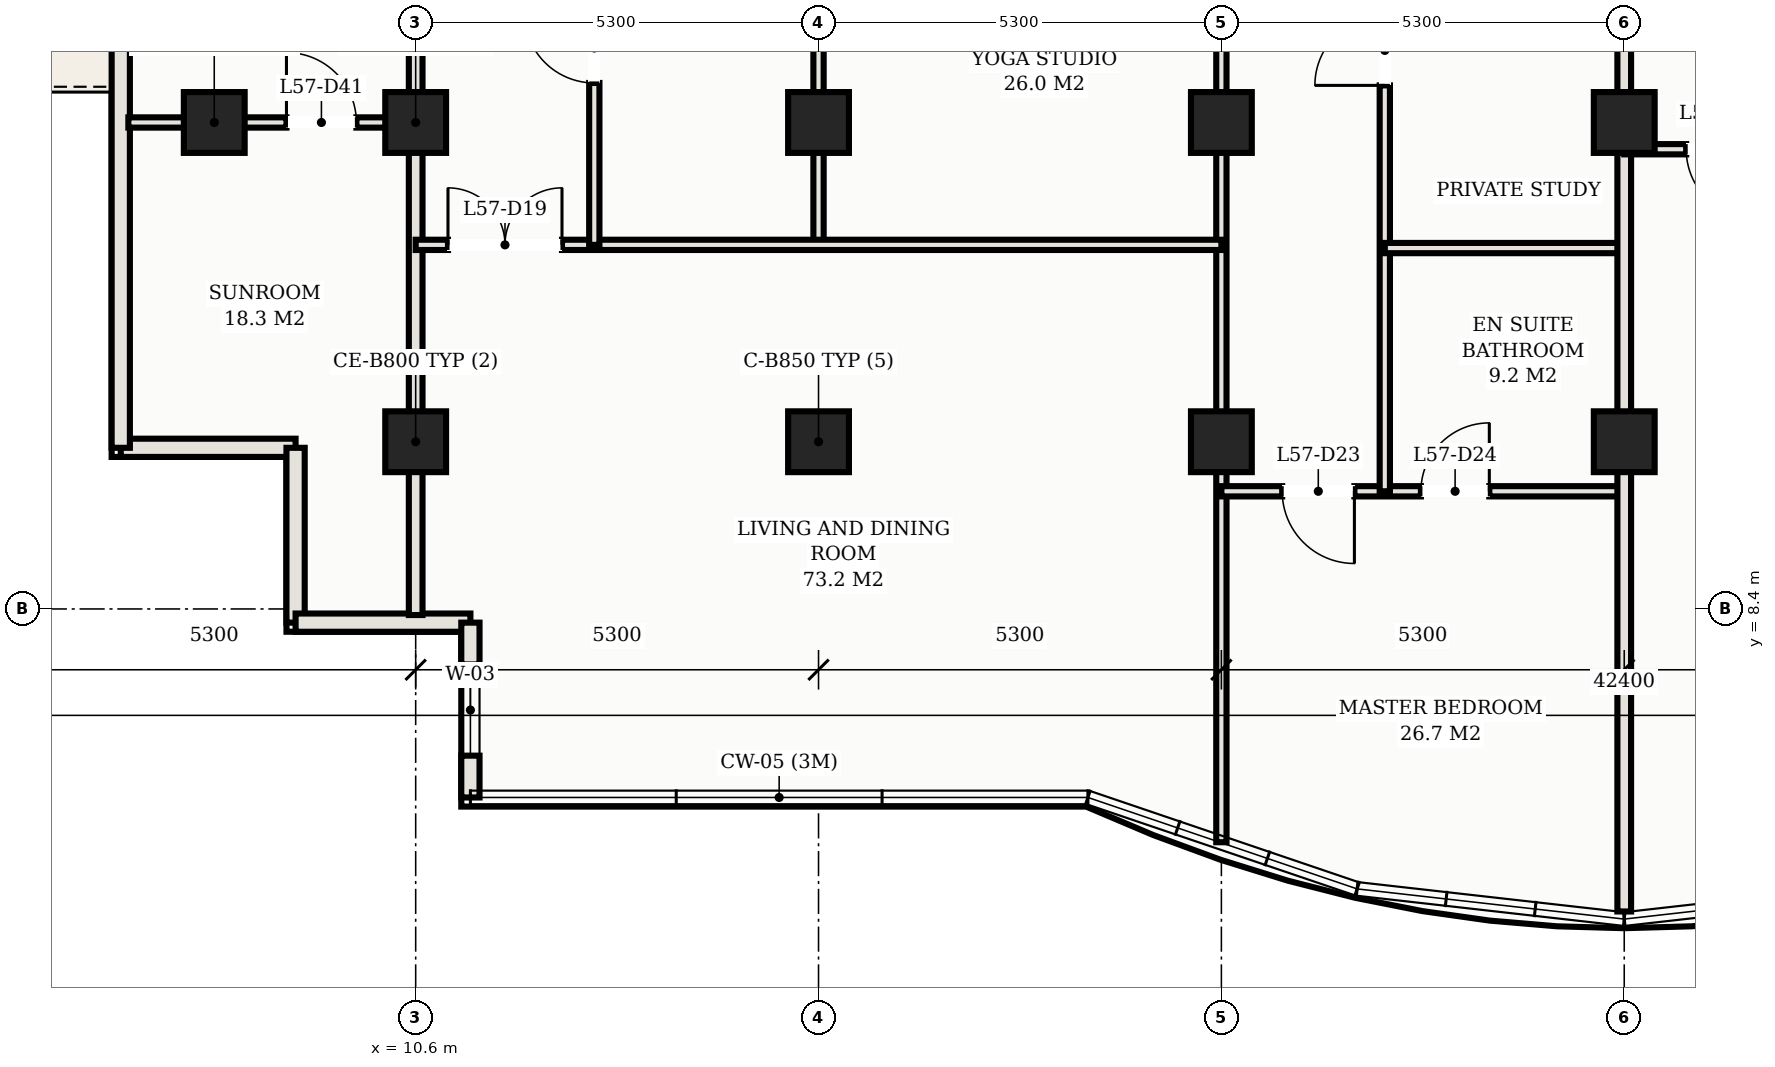
"""IFC4 building model, lengths in metres.
Left out: names, types, materials, properties, quantities, classifications, styles, units other than length and angle.
Written with IfcOpenShell. Run it as: python <this file> out.ifc"""

import sys

from ifc_helpers import new_model, si_unit, direction, frame, frame_2d, origin, origin_2d, place, context, subcontext, project, spatial, rectangle, hollow_rectangle, extrude, element, fill, save


model = new_model("IFC4")
c1 = context("Model", 3, precision=1e-05, world=origin(), true_north=direction((0.0, 1.0)))
c2 = subcontext(c1, "Body", "Model", "MODEL_VIEW")
j1 = project(units=[si_unit("LENGTHUNIT", "METRE"), si_unit("PLANEANGLEUNIT", "RADIAN")], contexts=[c1])
p1 = place(None, origin())
s1 = spatial("IfcSite", under=j1, at=p1, CompositionType="ELEMENT")
p2 = place(p1, origin())
s2 = spatial("IfcBuilding", under=s1, at=p2, CompositionType="ELEMENT")
p3 = place(p2, frame((0.0, 0.0, 209.9)))
s3 = spatial("IfcBuildingStorey", under=s2, at=p3, CompositionType="ELEMENT", Elevation=209.9)
for number, where, z_axis, x_axis in (
    (1, (10.6, 14.8, 0.0), (0.0, 0.0, 1.0), (1.0, 0.0, 0.0)),
    (2, (10.6, 10.6, 0.0), (0.0, 0.0, 1.0), (1.0, 0.0, 0.0)),
    (3, (15.9, 14.8, 0.0), (0.0, 0.0, 1.0), (1.0, 0.0, 0.0)),
    (4, (15.9, 10.6, 0.0), (0.0, 0.0, 1.0), (1.0, 0.0, 0.0)),
    (5, (21.2, 14.8, 0.0), (0.0, 0.0, 1.0), (1.0, 0.0, 0.0)),
    (6, (21.2, 10.6, 0.0), (0.0, 0.0, 1.0), (1.0, 0.0, 0.0)),
    (7, (26.5, 14.8, 0.0), (0.0, 0.0, 1.0), (1.0, 0.0, 0.0)),
    (8, (26.5, 10.6, 0.0), (0.0, 0.0, 1.0), (1.0, 0.0, 0.0)),
    (9, (7.95, 14.8, 0.0), (0.0, 0.0, 1.0), (1.0, 0.0, 0.0)),
):
    element("IfcColumn", number, at=place(p3, frame(where, z_axis=z_axis, x_axis=x_axis)), inside=s3, PredefinedType="COLUMN", context=c2, shape_type="SweptSolid", body=[
        extrude(hollow_rectangle(XDim=0.8, YDim=0.8, WallThickness=0.028, at=origin_2d()), origin(), (0.0, 0.0, 1.0), 3.3),
    ])
for number, where, z_axis, x_axis in (
    (10, (6.72, 10.52, 0.0), (0.0, 0.0, 1.0), (1.0, 0.0, 0.0)),
    (11, (9.02, 10.52, 0.0), (0.0, 0.0, 1.0), (0.0, -1.0, 0.0)),
    (12, (9.02, 8.22, 0.0), (0.0, 0.0, 1.0), (1.0, 0.0, 0.0)),
):
    element("IfcWall", number, at=place(p3, frame(where, z_axis=z_axis, x_axis=x_axis)), inside=s3, PredefinedType="SOLIDWALL", context=c2, shape_type="SweptSolid", body=[
        extrude(rectangle(XDim=2.3, YDim=0.24, at=frame_2d((1.15, 0.0))), origin(), (0.0, 0.0, 1.0), 3.11),
    ])
p4 = place(p3, frame((11.32, 8.22, 0.0), z_axis=(0.0, 0.0, 1.0), x_axis=(0.0, -1.0, 0.0)))
e13 = element("IfcWall", 13, at=p4, inside=s3, PredefinedType="SOLIDWALL", context=c2, shape_type="SweptSolid", body=[
    extrude(rectangle(XDim=2.3, YDim=0.24, at=frame_2d((1.15, 0.0))), origin(), (0.0, 0.0, 1.0), 3.11),
])
p5 = place(p4, frame((0.55, 0.0, 0.75)))
e14 = element("IfcOpeningElement", 14, at=p5, cuts=e13, PredefinedType="OPENING", context=c2, shape_type="SweptSolid", body=[
    extrude(rectangle(XDim=1.2, YDim=1.5, at=frame_2d((0.6, 0.75))), frame((0.0, 0.13, 0.0), z_axis=(0.0, -1.0, 0.0), x_axis=(1.0, 0.0, 0.0)), (0.0, 0.0, 1.0), 0.26),
])
p6 = place(p3, frame((6.72, 36.93, 0.0), z_axis=(0.0, 0.0, 1.0), x_axis=(0.0, -1.0, 0.0)))
e15 = element("IfcWall", 15, at=p6, inside=s3, PredefinedType="SOLIDWALL", context=c2, shape_type="SweptSolid", body=[
    extrude(rectangle(XDim=26.41, YDim=0.24, at=frame_2d((13.205, 0.0))), origin(), (0.0, 0.0, 1.0), 3.11),
])
p7 = place(p6, frame((18.13, 0.0, 0.0)))
e16 = element("IfcOpeningElement", 16, at=p7, cuts=e15, PredefinedType="OPENING", context=c2, shape_type="SweptSolid", body=[
    extrude(rectangle(XDim=1.8, YDim=2.2, at=frame_2d((0.9, 1.1))), frame((0.0, 0.13, 0.0), z_axis=(0.0, -1.0, 0.0), x_axis=(1.0, 0.0, 0.0)), (0.0, 0.0, 1.0), 0.26),
])
p8 = place(p3, frame((10.6, 8.32, 0.0), z_axis=(0.0, 0.0, 1.0), x_axis=(0.0, 1.0, 0.0)))
e17 = element("IfcWall", 17, at=p8, inside=s3, PredefinedType="PARTITIONING", context=c2, shape_type="SweptSolid", body=[
    extrude(rectangle(XDim=15.23, YDim=0.18, at=frame_2d((7.615, 0.0))), origin(), (0.0, 0.0, 1.0), 2.43),
])
p9 = place(p3, frame((15.9, 14.8, 0.0), z_axis=(0.0, 0.0, 1.0), x_axis=(0.0, 1.0, 0.0)))
e18 = element("IfcWall", 18, at=p9, inside=s3, PredefinedType="PARTITIONING", context=c2, shape_type="SweptSolid", body=[
    extrude(rectangle(XDim=8.75, YDim=0.135, at=frame_2d((4.375, 0.0))), origin(), (0.0, 0.0, 1.0), 2.43),
])
p10 = place(p9, frame((7.015, 0.0, 0.0)))
e19 = element("IfcOpeningElement", 19, at=p10, cuts=e18, PredefinedType="OPENING", context=c2, shape_type="SweptSolid", body=[
    extrude(rectangle(XDim=0.92, YDim=2.15, at=frame_2d((0.46, 1.075))), frame((0.0, 0.078, 0.0), z_axis=(0.0, -1.0, 0.0), x_axis=(1.0, 0.0, 0.0)), (0.0, 0.0, 1.0), 0.155),
])
p11 = place(p3, frame((21.2, 5.331, 0.0), z_axis=(0.0, 0.0, 1.0), x_axis=(0.0, 1.0, 0.0)))
e20 = element("IfcWall", 20, at=p11, inside=s3, PredefinedType="PARTITIONING", context=c2, shape_type="SweptSolid", body=[
    extrude(rectangle(XDim=18.219, YDim=0.135, at=frame_2d((9.109, 0.0))), origin(), (0.0, 0.0, 1.0), 2.43),
])
p12 = place(p11, frame((16.434, 0.0, 0.0)))
e21 = element("IfcOpeningElement", 21, at=p12, cuts=e20, PredefinedType="OPENING", context=c2, shape_type="SweptSolid", body=[
    extrude(rectangle(XDim=0.92, YDim=2.15, at=frame_2d((0.46, 1.075))), frame((0.0, 0.078, 0.0), z_axis=(0.0, -1.0, 0.0), x_axis=(1.0, 0.0, 0.0)), (0.0, 0.0, 1.0), 0.155),
])
p13 = place(p3, frame((15.9, 13.19, 0.0), z_axis=(0.0, 0.0, 1.0), x_axis=(0.0, 1.0, 0.0)))
e22 = element("IfcWall", 22, at=p13, inside=s3, PredefinedType="PARTITIONING", context=c2, shape_type="SweptSolid", body=[
    extrude(rectangle(XDim=1.61, YDim=0.135, at=frame_2d((0.805, 0.0))), origin(), (0.0, 0.0, 1.0), 2.43),
])
p14 = place(p3, frame((10.6, 13.19, 0.0), z_axis=(0.0, 0.0, 1.0), x_axis=(1.0, 0.0, 0.0)))
e23 = element("IfcWall", 23, at=p14, inside=s3, PredefinedType="PARTITIONING", context=c2, shape_type="SweptSolid", body=[
    extrude(rectangle(XDim=10.6, YDim=0.135, at=frame_2d((5.3, 0.0))), origin(), (0.0, 0.0, 1.0), 2.43),
])
p15 = place(p14, frame((0.425, 0.0, 0.0)))
e24 = element("IfcOpeningElement", 24, at=p15, cuts=e23, PredefinedType="OPENING", context=c2, shape_type="SweptSolid", body=[
    extrude(rectangle(XDim=1.5, YDim=2.25, at=frame_2d((0.75, 1.125))), frame((0.0, 0.078, 0.0), z_axis=(0.0, -1.0, 0.0), x_axis=(1.0, 0.0, 0.0)), (0.0, 0.0, 1.0), 0.155),
])
p16 = place(p3, frame((12.95, 13.19, 0.0), z_axis=(0.0, 0.0, 1.0), x_axis=(0.0, 1.0, 0.0)))
e25 = element("IfcWall", 25, at=p16, inside=s3, PredefinedType="PARTITIONING", context=c2, shape_type="SweptSolid", body=[
    extrude(rectangle(XDim=10.36, YDim=0.135, at=frame_2d((5.18, 0.0))), origin(), (0.0, 0.0, 1.0), 2.43),
])
p17 = place(p16, frame((2.13, 0.0, 0.0)))
e26 = element("IfcOpeningElement", 26, at=p17, cuts=e25, PredefinedType="OPENING", context=c2, shape_type="SweptSolid", body=[
    extrude(rectangle(XDim=0.92, YDim=2.15, at=frame_2d((0.46, 1.075))), frame((0.0, 0.078, 0.0), z_axis=(0.0, -1.0, 0.0), x_axis=(1.0, 0.0, 0.0)), (0.0, 0.0, 1.0), 0.155),
])
p18 = place(p16, frame((7.32, 0.0, 0.0)))
e27 = element("IfcOpeningElement", 27, at=p18, cuts=e25, PredefinedType="OPENING", context=c2, shape_type="SweptSolid", body=[
    extrude(rectangle(XDim=0.9, YDim=2.15, at=frame_2d((0.45, 1.075))), frame((0.0, 0.078, 0.0), z_axis=(0.0, -1.0, 0.0), x_axis=(1.0, 0.0, 0.0)), (0.0, 0.0, 1.0), 0.155),
])
p19 = place(p3, frame((21.2, 9.948, 0.0), z_axis=(0.0, 0.0, 1.0), x_axis=(1.0, 0.0, 0.0)))
e28 = element("IfcWall", 28, at=p19, inside=s3, PredefinedType="PARTITIONING", context=c2, shape_type="SweptSolid", body=[
    extrude(rectangle(XDim=5.3, YDim=0.135, at=frame_2d((2.65, 0.0))), origin(), (0.0, 0.0, 1.0), 2.43),
])
p20 = place(p19, frame((0.8, 0.0, 0.0)))
e29 = element("IfcOpeningElement", 29, at=p20, cuts=e28, PredefinedType="OPENING", context=c2, shape_type="SweptSolid", body=[
    extrude(rectangle(XDim=0.95, YDim=2.15, at=frame_2d((0.475, 1.075))), frame((0.0, 0.078, 0.0), z_axis=(0.0, -1.0, 0.0), x_axis=(1.0, 0.0, 0.0)), (0.0, 0.0, 1.0), 0.155),
])
p21 = place(p19, frame((2.625, 0.0, 0.0)))
e30 = element("IfcOpeningElement", 30, at=p21, cuts=e28, PredefinedType="OPENING", context=c2, shape_type="SweptSolid", body=[
    extrude(rectangle(XDim=0.9, YDim=2.15, at=frame_2d((0.45, 1.075))), frame((0.0, 0.078, 0.0), z_axis=(0.0, -1.0, 0.0), x_axis=(1.0, 0.0, 0.0)), (0.0, 0.0, 1.0), 0.155),
])
p22 = place(p3, frame((23.35, 9.948, 0.0), z_axis=(0.0, 0.0, 1.0), x_axis=(0.0, 1.0, 0.0)))
e31 = element("IfcWall", 31, at=p22, inside=s3, PredefinedType="PARTITIONING", context=c2, shape_type="SweptSolid", body=[
    extrude(rectangle(XDim=13.602, YDim=0.135, at=frame_2d((6.801, 0.0))), origin(), (0.0, 0.0, 1.0), 2.43),
])
p23 = place(p22, frame((5.34, 0.0, 0.0)))
e32 = element("IfcOpeningElement", 32, at=p23, cuts=e31, PredefinedType="OPENING", context=c2, shape_type="SweptSolid", body=[
    extrude(rectangle(XDim=0.92, YDim=2.15, at=frame_2d((0.46, 1.075))), frame((0.0, 0.078, 0.0), z_axis=(0.0, -1.0, 0.0), x_axis=(1.0, 0.0, 0.0)), (0.0, 0.0, 1.0), 0.155),
])
p24 = place(p3, frame((23.35, 13.148, 0.0), z_axis=(0.0, 0.0, 1.0), x_axis=(1.0, 0.0, 0.0)))
e33 = element("IfcWall", 33, at=p24, inside=s3, PredefinedType="PARTITIONING", context=c2, shape_type="SweptSolid", body=[
    extrude(rectangle(XDim=3.15, YDim=0.135, at=frame_2d((1.575, 0.0))), origin(), (0.0, 0.0, 1.0), 2.43),
])
p25 = place(p3, frame((26.5, 4.42, 0.0), z_axis=(0.0, 0.0, 1.0), x_axis=(0.0, 1.0, 0.0)))
e34 = element("IfcWall", 34, at=p25, inside=s3, PredefinedType="PARTITIONING", context=c2, shape_type="SweptSolid", body=[
    extrude(rectangle(XDim=19.13, YDim=0.18, at=frame_2d((9.565, 0.0))), origin(), (0.0, 0.0, 1.0), 2.43),
])
p26 = place(p3, frame((26.5, 14.448, 0.0), z_axis=(0.0, 0.0, 1.0), x_axis=(1.0, 0.0, 0.0)))
e35 = element("IfcWall", 35, at=p26, inside=s3, PredefinedType="PARTITIONING", context=c2, shape_type="SweptSolid", body=[
    extrude(rectangle(XDim=5.3, YDim=0.135, at=frame_2d((2.65, 0.0))), origin(), (0.0, 0.0, 1.0), 2.43),
])
p27 = place(p26, frame((0.815, 0.0, 0.0)))
e36 = element("IfcOpeningElement", 36, at=p27, cuts=e35, PredefinedType="OPENING", context=c2, shape_type="SweptSolid", body=[
    extrude(rectangle(XDim=0.92, YDim=2.15, at=frame_2d((0.46, 1.075))), frame((0.0, 0.078, 0.0), z_axis=(0.0, -1.0, 0.0), x_axis=(1.0, 0.0, 0.0)), (0.0, 0.0, 1.0), 0.155),
])
p28 = place(p3, frame((6.82, 14.8, 0.0), z_axis=(0.0, 0.0, 1.0), x_axis=(1.0, 0.0, 0.0)))
e37 = element("IfcWall", 37, at=p28, inside=s3, PredefinedType="PARTITIONING", context=c2, shape_type="SweptSolid", body=[
    extrude(rectangle(XDim=3.78, YDim=0.135, at=frame_2d((1.89, 0.0))), origin(), (0.0, 0.0, 1.0), 2.43),
])
p29 = place(p28, frame((2.08, 0.0, 0.0)))
e38 = element("IfcOpeningElement", 38, at=p29, cuts=e37, PredefinedType="OPENING", context=c2, shape_type="SweptSolid", body=[
    extrude(rectangle(XDim=0.92, YDim=2.15, at=frame_2d((0.46, 1.075))), frame((0.0, 0.078, 0.0), z_axis=(0.0, -1.0, 0.0), x_axis=(1.0, 0.0, 0.0)), (0.0, 0.0, 1.0), 0.155),
])
p30 = place(p5, origin())
e39 = element("IfcWindow", 39, at=p30, inside=s3, PartitioningType="SINGLE_PANEL", PredefinedType="WINDOW", context=c2, shape_type="SweptSolid", body=[
    extrude(rectangle(XDim=1.2, YDim=1.5, at=frame_2d((0.6, 0.75))), frame((0.0, 0.03, 0.0), z_axis=(0.0, -1.0, 0.0), x_axis=(1.0, 0.0, 0.0)), (0.0, 0.0, 1.0), 0.06),
])
fill(e14, e39)
p31 = place(p15, origin())
e40 = element("IfcDoor", 40, at=p31, inside=s3, OperationType="DOUBLE_DOOR_SINGLE_SWING", PredefinedType="DOOR", context=c2, shape_type="SweptSolid", body=[
    extrude(rectangle(XDim=1.5, YDim=2.25, at=frame_2d((0.75, 1.125))), frame((0.0, 0.025, 0.0), z_axis=(0.0, -1.0, 0.0), x_axis=(1.0, 0.0, 0.0)), (0.0, 0.0, 1.0), 0.05),
])
fill(e24, e40)
p32 = place(p17, origin())
e41 = element("IfcDoor", 41, at=p32, inside=s3, OperationType="SINGLE_SWING_RIGHT", PredefinedType="DOOR", context=c2, shape_type="SweptSolid", body=[
    extrude(rectangle(XDim=0.92, YDim=2.15, at=frame_2d((0.46, 1.075))), frame((0.0, 0.025, 0.0), z_axis=(0.0, -1.0, 0.0), x_axis=(1.0, 0.0, 0.0)), (0.0, 0.0, 1.0), 0.05),
])
fill(e26, e41)
p33 = place(p20, frame((0.95, 0.0, 0.0), z_axis=(0.0, 0.0, 1.0), x_axis=(-1.0, 0.0, 0.0)))
e42 = element("IfcDoor", 42, at=p33, inside=s3, OperationType="SINGLE_SWING_LEFT", PredefinedType="DOOR", context=c2, shape_type="SweptSolid", body=[
    extrude(rectangle(XDim=0.95, YDim=2.15, at=frame_2d((0.475, 1.075))), frame((0.0, 0.025, 0.0), z_axis=(0.0, -1.0, 0.0), x_axis=(1.0, 0.0, 0.0)), (0.0, 0.0, 1.0), 0.05),
])
fill(e29, e42)
p34 = place(p21, origin())
e43 = element("IfcDoor", 43, at=p34, inside=s3, OperationType="SINGLE_SWING_RIGHT", PredefinedType="DOOR", context=c2, shape_type="SweptSolid", body=[
    extrude(rectangle(XDim=0.9, YDim=2.15, at=frame_2d((0.45, 1.075))), frame((0.0, 0.025, 0.0), z_axis=(0.0, -1.0, 0.0), x_axis=(1.0, 0.0, 0.0)), (0.0, 0.0, 1.0), 0.05),
])
fill(e30, e43)
p35 = place(p23, origin())
e44 = element("IfcDoor", 44, at=p35, inside=s3, OperationType="SINGLE_SWING_LEFT", PredefinedType="DOOR", context=c2, shape_type="SweptSolid", body=[
    extrude(rectangle(XDim=0.92, YDim=2.15, at=frame_2d((0.46, 1.075))), frame((0.0, 0.025, 0.0), z_axis=(0.0, -1.0, 0.0), x_axis=(1.0, 0.0, 0.0)), (0.0, 0.0, 1.0), 0.05),
])
fill(e32, e44)
p36 = place(p27, frame((0.92, 0.0, 0.0), z_axis=(0.0, 0.0, 1.0), x_axis=(-1.0, 0.0, 0.0)))
e45 = element("IfcDoor", 45, at=p36, inside=s3, OperationType="SINGLE_SWING_LEFT", PredefinedType="DOOR", context=c2, shape_type="SweptSolid", body=[
    extrude(rectangle(XDim=0.92, YDim=2.15, at=frame_2d((0.46, 1.075))), frame((0.0, 0.025, 0.0), z_axis=(0.0, -1.0, 0.0), x_axis=(1.0, 0.0, 0.0)), (0.0, 0.0, 1.0), 0.05),
])
fill(e36, e45)
p37 = place(p29, origin())
e46 = element("IfcDoor", 46, at=p37, inside=s3, OperationType="SINGLE_SWING_LEFT", PredefinedType="DOOR", context=c2, shape_type="SweptSolid", body=[
    extrude(rectangle(XDim=0.92, YDim=2.15, at=frame_2d((0.46, 1.075))), frame((0.0, 0.025, 0.0), z_axis=(0.0, -1.0, 0.0), x_axis=(1.0, 0.0, 0.0)), (0.0, 0.0, 1.0), 0.05),
])
fill(e38, e46)
save(model, sys.argv[1])
